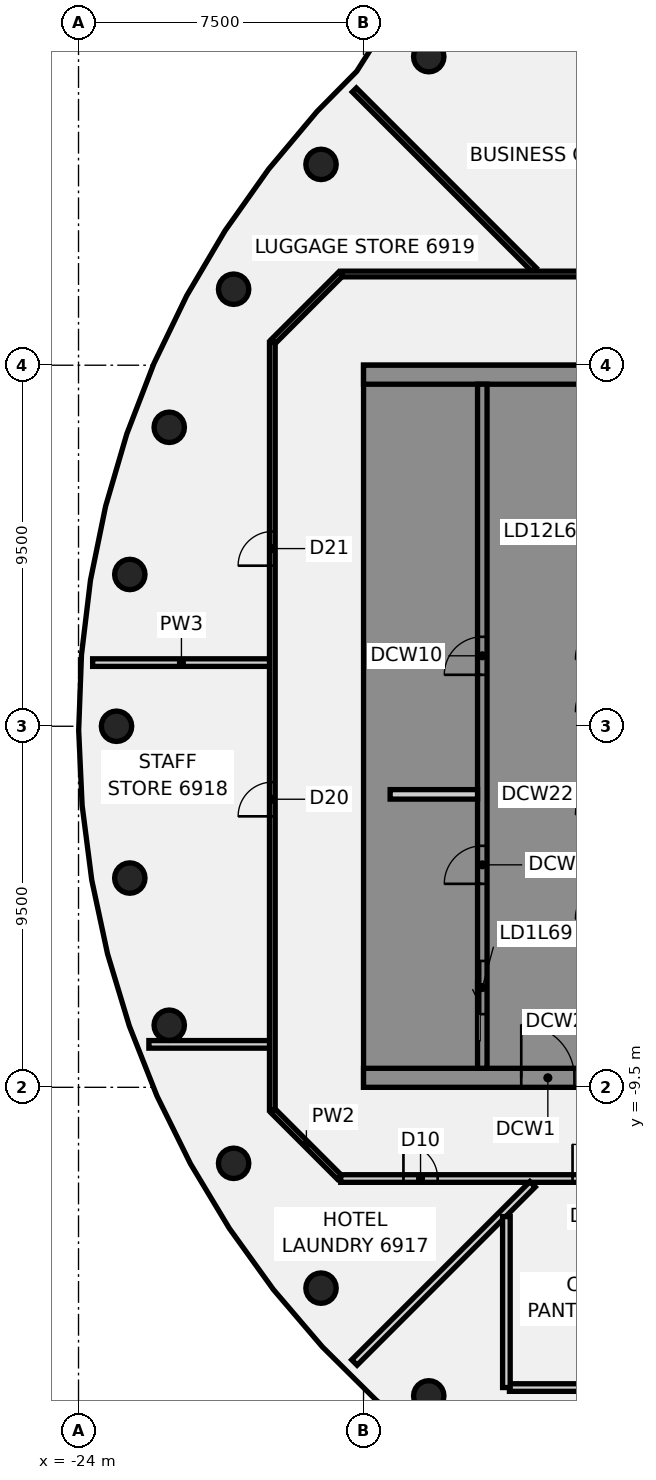
"""IFC4 building model, lengths in metres.
Left out: names, types, materials, properties, quantities, classifications, styles, units other than length and angle.
Written with IfcOpenShell. Run it as: python <this file> out.ifc"""

import sys

from ifc_helpers import new_model, si_unit, direction, frame, frame_2d, origin, origin_2d, place, context, subcontext, project, spatial, polyline, rectangle, circle, outline, extrude, element, fill, save


model = new_model("IFC4")
c1 = context("Model", 3, precision=1e-05, world=origin(), true_north=direction((0.0, 1.0)))
c2 = subcontext(c1, "Body", "Model", "MODEL_VIEW")
j1 = project(units=[si_unit("LENGTHUNIT", "METRE"), si_unit("PLANEANGLEUNIT", "RADIAN")], contexts=[c1])
p1 = place(None, origin())
s1 = spatial("IfcSite", under=j1, at=p1, CompositionType="ELEMENT")
p2 = place(p1, origin())
s2 = spatial("IfcBuilding", under=s1, at=p2, CompositionType="ELEMENT")
p3 = place(p2, frame((0.0, 0.0, 271.2)))
s3 = spatial("IfcBuildingStorey", under=s2, at=p3, CompositionType="ELEMENT", Elevation=271.2)
for number, where, z_axis, x_axis in (
    (1, (-14.784, 17.619, -0.14), (0.0, 0.0, 1.0), (1.0, 0.0, 0.0)),
    (2, (-17.619, 14.784, -0.14), (0.0, 0.0, 1.0), (1.0, 0.0, 0.0)),
    (3, (-19.919, 11.5, -0.14), (0.0, 0.0, 1.0), (1.0, 0.0, 0.0)),
    (4, (-21.613, 7.866, -0.14), (0.0, 0.0, 1.0), (1.0, 0.0, 0.0)),
    (5, (-22.651, 3.994, -0.14), (0.0, 0.0, 1.0), (1.0, 0.0, 0.0)),
    (6, (-23.0, 0.0, -0.14), (0.0, 0.0, 1.0), (1.0, 0.0, 0.0)),
    (7, (-22.651, -3.994, -0.14), (0.0, 0.0, 1.0), (1.0, 0.0, 0.0)),
    (8, (-21.613, -7.866, -0.14), (0.0, 0.0, 1.0), (1.0, 0.0, 0.0)),
    (9, (-19.919, -11.5, -0.14), (0.0, 0.0, 1.0), (1.0, 0.0, 0.0)),
    (10, (-17.619, -14.784, -0.14), (0.0, 0.0, 1.0), (1.0, 0.0, 0.0)),
    (11, (-14.784, -17.619, -0.14), (0.0, 0.0, 1.0), (1.0, 0.0, 0.0)),
):
    element("IfcColumn", number, at=place(p3, frame(where, z_axis=z_axis, x_axis=x_axis)), inside=s3, PredefinedType="COLUMN", context=c2, shape_type="SweptSolid", body=[
        extrude(circle(Radius=0.4, at=origin_2d()), origin(), (0.0, 0.0, 1.0), 3.6),
    ])
p4 = place(p3, frame((-18.872, -10.128, 0.0), z_axis=(0.0, 0.0, 1.0), x_axis=(0.707106781187, -0.707106781187, 0.0)))
e12 = element("IfcWall", 12, at=p4, inside=s3, PredefinedType="PARTITIONING", context=c2, shape_type="SweptSolid", body=[
    extrude(rectangle(XDim=2.455, YDim=0.15, at=frame_2d((1.228, 0.0))), origin(), (0.0, 0.0, 1.0), 2.864),
])
p5 = place(p3, frame((-16.742, 16.742, 0.0), z_axis=(0.0, 0.0, 1.0), x_axis=(0.707106781187, -0.707106781187, 0.0)))
e13 = element("IfcWall", 13, at=p5, inside=s3, PredefinedType="PARTITIONING", context=c2, shape_type="SweptSolid", body=[
    extrude(rectangle(XDim=6.692, YDim=0.15, at=frame_2d((3.346, 0.0))), origin(), (0.0, 0.0, 1.0), 2.864),
])
p6 = place(p3, frame((-15.829, 20.775, 0.0), z_axis=(0.0, 0.0, 1.0), x_axis=(0.912288876362, -0.409547318469, 0.0)))
e14 = element("IfcWall", 14, at=p6, inside=s3, PredefinedType="PARTITIONING", context=c2, shape_type="SweptSolid", body=[
    extrude(rectangle(XDim=21.366, YDim=0.15, at=frame_2d((10.683, 0.0))), origin(), (0.0, 0.0, 1.0), 2.864),
])
p7 = place(p6, frame((13.889, 0.0, 0.0)))
e15 = element("IfcOpeningElement", 15, at=p7, cuts=e14, PredefinedType="OPENING", context=c2, shape_type="SweptSolid", body=[
    extrude(rectangle(XDim=1.8, YDim=2.1, at=frame_2d((0.9, 1.05))), frame((0.0, 0.085, 0.0), z_axis=(0.0, -1.0, 0.0), x_axis=(1.0, 0.0, 0.0)), (0.0, 0.0, 1.0), 0.17),
])
p8 = place(p3, frame((-23.629, 1.675, 0.0), z_axis=(0.0, 0.0, 1.0), x_axis=(1.0, 0.0, 0.0)))
e16 = element("IfcWall", 16, at=p8, inside=s3, PredefinedType="PARTITIONING", context=c2, shape_type="SweptSolid", body=[
    extrude(rectangle(XDim=4.674, YDim=0.2, at=frame_2d((2.337, 0.0))), origin(), (0.0, 0.0, 1.0), 2.864),
])
p9 = place(p3, frame((-22.148, -8.37, 0.0), z_axis=(0.0, 0.0, 1.0), x_axis=(1.0, 0.0, 0.0)))
e17 = element("IfcWall", 17, at=p9, inside=s3, PredefinedType="PARTITIONING", context=c2, shape_type="SweptSolid", body=[
    extrude(rectangle(XDim=3.193, YDim=0.2, at=frame_2d((1.597, 0.0))), origin(), (0.0, 0.0, 1.0), 2.864),
])
p10 = place(p3, frame((-17.1, -11.9, 0.0), z_axis=(0.0, 0.0, 1.0), x_axis=(1.0, 0.0, 0.0)))
e18 = element("IfcWall", 18, at=p10, inside=s3, PredefinedType="PARTITIONING", context=c2, shape_type="SweptSolid", body=[
    extrude(rectangle(XDim=34.165, YDim=0.2, at=frame_2d((17.083, 0.0))), origin(), (0.0, 0.0, 1.0), 2.864),
])
p11 = place(p10, frame((6.1, 0.0, 0.0)))
e19 = element("IfcOpeningElement", 19, at=p11, cuts=e18, PredefinedType="OPENING", context=c2, shape_type="SweptSolid", body=[
    extrude(rectangle(XDim=0.9, YDim=2.1, at=frame_2d((0.45, 1.05))), frame((0.0, 0.11, 0.0), z_axis=(0.0, -1.0, 0.0), x_axis=(1.0, 0.0, 0.0)), (0.0, 0.0, 1.0), 0.22),
])
p12 = place(p10, frame((26.541, 0.0, 0.0)))
e20 = element("IfcOpeningElement", 20, at=p12, cuts=e18, PredefinedType="OPENING", context=c2, shape_type="SweptSolid", body=[
    extrude(rectangle(XDim=1.8, YDim=2.1, at=frame_2d((0.9, 1.05))), frame((0.0, 0.11, 0.0), z_axis=(0.0, -1.0, 0.0), x_axis=(1.0, 0.0, 0.0)), (0.0, 0.0, 1.0), 0.22),
])
p13 = place(p10, frame((17.778, 0.0, 0.0)))
e21 = element("IfcOpeningElement", 21, at=p13, cuts=e18, PredefinedType="OPENING", context=c2, shape_type="SweptSolid", body=[
    extrude(rectangle(XDim=1.8, YDim=2.1, at=frame_2d((0.9, 1.05))), frame((0.0, 0.11, 0.0), z_axis=(0.0, -1.0, 0.0), x_axis=(1.0, 0.0, 0.0)), (0.0, 0.0, 1.0), 0.22),
])
p14 = place(p10, frame((10.359, 0.0, 0.0)))
e22 = element("IfcOpeningElement", 22, at=p14, cuts=e18, PredefinedType="OPENING", context=c2, shape_type="SweptSolid", body=[
    extrude(rectangle(XDim=0.9, YDim=2.1, at=frame_2d((0.45, 1.05))), frame((0.0, 0.11, 0.0), z_axis=(0.0, -1.0, 0.0), x_axis=(1.0, 0.0, 0.0)), (0.0, 0.0, 1.0), 0.22),
])
p15 = place(p10, frame((1.65, 0.0, 0.0)))
e23 = element("IfcOpeningElement", 23, at=p15, cuts=e18, PredefinedType="OPENING", context=c2, shape_type="SweptSolid", body=[
    extrude(rectangle(XDim=0.9, YDim=2.1, at=frame_2d((0.45, 1.05))), frame((0.0, 0.11, 0.0), z_axis=(0.0, -1.0, 0.0), x_axis=(1.0, 0.0, 0.0)), (0.0, 0.0, 1.0), 0.22),
])
p16 = place(p3, frame((-17.065, 11.9, 0.0), z_axis=(0.0, 0.0, 1.0), x_axis=(1.0, 0.0, 0.0)))
e24 = element("IfcWall", 24, at=p16, inside=s3, PredefinedType="PARTITIONING", context=c2, shape_type="SweptSolid", body=[
    extrude(rectangle(XDim=34.165, YDim=0.15, at=frame_2d((17.083, 0.0))), origin(), (0.0, 0.0, 1.0), 2.864),
])
p17 = place(p16, frame((23.556, 0.0, 0.0)))
e25 = element("IfcOpeningElement", 25, at=p17, cuts=e24, PredefinedType="OPENING", context=c2, shape_type="SweptSolid", body=[
    extrude(rectangle(XDim=1.8, YDim=2.1, at=frame_2d((0.9, 1.05))), frame((0.0, 0.085, 0.0), z_axis=(0.0, -1.0, 0.0), x_axis=(1.0, 0.0, 0.0)), (0.0, 0.0, 1.0), 0.17),
])
p18 = place(p16, frame((30.465, 0.0, 0.0)))
e26 = element("IfcOpeningElement", 26, at=p18, cuts=e24, PredefinedType="OPENING", context=c2, shape_type="SweptSolid", body=[
    extrude(rectangle(XDim=0.9, YDim=2.1, at=frame_2d((0.45, 1.05))), frame((0.0, 0.085, 0.0), z_axis=(0.0, -1.0, 0.0), x_axis=(1.0, 0.0, 0.0)), (0.0, 0.0, 1.0), 0.17),
])
p19 = place(p16, frame((12.215, 0.0, 0.0)))
e27 = element("IfcOpeningElement", 27, at=p19, cuts=e24, PredefinedType="OPENING", context=c2, shape_type="SweptSolid", body=[
    extrude(rectangle(XDim=1.8, YDim=2.1, at=frame_2d((0.9, 1.05))), frame((0.0, 0.085, 0.0), z_axis=(0.0, -1.0, 0.0), x_axis=(1.0, 0.0, 0.0)), (0.0, 0.0, 1.0), 0.17),
])
p20 = place(p3, frame((-12.661, -17.4, 0.0), z_axis=(0.0, 0.0, 1.0), x_axis=(1.0, 0.0, 0.0)))
e28 = element("IfcWall", 28, at=p20, inside=s3, PredefinedType="PARTITIONING", context=c2, shape_type="SweptSolid", body=[
    extrude(rectangle(XDim=4.34, YDim=0.2, at=frame_2d((2.17, 0.0))), origin(), (0.0, 0.0, 1.0), 2.864),
])
p21 = place(p3, frame((-18.872, 10.128, 0.0), z_axis=(0.0, 0.0, 1.0), x_axis=(0.707106781187, 0.707106781187, 0.0)))
e29 = element("IfcWall", 29, at=p21, inside=s3, PredefinedType="PARTITIONING", context=c2, shape_type="SweptSolid", body=[
    extrude(rectangle(XDim=2.505, YDim=0.15, at=frame_2d((1.253, 0.0))), origin(), (0.0, 0.0, 1.0), 2.864),
])
p22 = place(p3, frame((-16.74, -16.74, 0.0), z_axis=(0.0, 0.0, 1.0), x_axis=(0.707106781187, 0.707106781187, 0.0)))
e30 = element("IfcWall", 30, at=p22, inside=s3, PredefinedType="PARTITIONING", context=c2, shape_type="SweptSolid", body=[
    extrude(rectangle(XDim=6.631, YDim=0.2, at=frame_2d((3.315, 0.0))), origin(), (0.0, 0.0, 1.0), 2.864),
])
p23 = place(p3, frame((-18.9, -10.1, 0.0), z_axis=(0.0, 0.0, 1.0), x_axis=(0.0, 1.0, 0.0)))
e31 = element("IfcWall", 31, at=p23, inside=s3, PredefinedType="PARTITIONING", context=c2, shape_type="SweptSolid", body=[
    extrude(rectangle(XDim=20.2, YDim=0.15, at=frame_2d((10.1, 0.0))), origin(), (0.0, 0.0, 1.0), 2.864),
])
p24 = place(p23, frame((7.73, 0.0, 0.0)))
e32 = element("IfcOpeningElement", 32, at=p24, cuts=e31, PredefinedType="OPENING", context=c2, shape_type="SweptSolid", body=[
    extrude(rectangle(XDim=0.9, YDim=2.1, at=frame_2d((0.45, 1.05))), frame((0.0, 0.085, 0.0), z_axis=(0.0, -1.0, 0.0), x_axis=(1.0, 0.0, 0.0)), (0.0, 0.0, 1.0), 0.17),
])
p25 = place(p23, frame((14.325, 0.0, 0.0)))
e33 = element("IfcOpeningElement", 33, at=p25, cuts=e31, PredefinedType="OPENING", context=c2, shape_type="SweptSolid", body=[
    extrude(rectangle(XDim=0.9, YDim=2.1, at=frame_2d((0.45, 1.05))), frame((0.0, 0.085, 0.0), z_axis=(0.0, -1.0, 0.0), x_axis=(1.0, 0.0, 0.0)), (0.0, 0.0, 1.0), 0.17),
])
p26 = place(p3, frame((-12.741, -17.4, 0.0), z_axis=(0.0, 0.0, 1.0), x_axis=(0.0, 1.0, 0.0)))
e34 = element("IfcWall", 34, at=p26, inside=s3, PredefinedType="PARTITIONING", context=c2, shape_type="SweptSolid", body=[
    extrude(rectangle(XDim=4.499, YDim=0.2, at=frame_2d((2.25, 0.0))), origin(), (0.0, 0.0, 1.0), 2.864),
])
p27 = place(p3, frame((-16.5, -9.25, 0.0), z_axis=(0.0, 0.0, 1.0), x_axis=(1.0, 0.0, 0.0)))
e35 = element("IfcWall", 35, at=p27, inside=s3, PredefinedType="SHEAR", context=c2, shape_type="SweptSolid", body=[
    extrude(rectangle(XDim=13.0, YDim=0.5, at=frame_2d((6.5, 0.0))), origin(), (0.0, 0.0, 1.0), 3.46),
])
p28 = place(p27, frame((4.15, 0.0, 0.0)))
e36 = element("IfcOpeningElement", 36, at=p28, cuts=e35, PredefinedType="OPENING", context=c2, shape_type="SweptSolid", body=[
    extrude(rectangle(XDim=1.4, YDim=2.1, at=frame_2d((0.7, 1.05))), frame((0.0, 0.26, 0.0), z_axis=(0.0, -1.0, 0.0), x_axis=(1.0, 0.0, 0.0)), (0.0, 0.0, 1.0), 0.52),
])
p29 = place(p27, frame((10.125, 0.0, 0.0)))
e37 = element("IfcOpeningElement", 37, at=p29, cuts=e35, PredefinedType="OPENING", context=c2, shape_type="SweptSolid", body=[
    extrude(rectangle(XDim=1.4, YDim=2.1, at=frame_2d((0.7, 1.05))), frame((0.0, 0.26, 0.0), z_axis=(0.0, -1.0, 0.0), x_axis=(1.0, 0.0, 0.0)), (0.0, 0.0, 1.0), 0.52),
])
p30 = place(p3, origin())
e38 = element("IfcWall", 38, at=p30, inside=s3, PredefinedType="SHEAR", context=c2, shape_type="SweptSolid", body=[
    extrude(outline(polyline([(-13.5, -8.125), (-16.0, -8.125), (-16.0, -5.625), (-13.5, -5.625), (-13.5, -5.375), (-16.0, -5.375), (-16.0, 5.375), (-13.5, 5.375), (-13.5, 5.625), (-16.0, 5.625), (-16.0, 8.125), (-13.5, 8.125), (-13.5, 9.0), (-16.0, 9.0), (-16.5, 9.0), (-16.5, -9.0), (-16.0, -9.0), (-13.5, -9.0), (-13.5, -8.125)])), origin(), (0.0, 0.0, 1.0), 3.46),
])
p31 = place(p3, frame((-16.5, 9.25, 0.0), z_axis=(0.0, 0.0, 1.0), x_axis=(1.0, 0.0, 0.0)))
e39 = element("IfcWall", 39, at=p31, inside=s3, PredefinedType="SHEAR", context=c2, shape_type="SweptSolid", body=[
    extrude(rectangle(XDim=13.0, YDim=0.5, at=frame_2d((6.5, 0.0))), origin(), (0.0, 0.0, 1.0), 3.46),
])
p32 = place(p3, frame((-13.375, -9.0, 0.0), z_axis=(0.0, 0.0, 1.0), x_axis=(0.0, 1.0, 0.0)))
e40 = element("IfcWall", 40, at=p32, inside=s3, PredefinedType="SHEAR", context=c2, shape_type="SweptSolid", body=[
    extrude(rectangle(XDim=18.0, YDim=0.25, at=frame_2d((9.0, 0.0))), origin(), (0.0, 0.0, 1.0), 3.46),
])
p33 = place(p32, frame((1.425, 0.0, 0.0)))
e41 = element("IfcOpeningElement", 41, at=p33, cuts=e40, PredefinedType="OPENING", context=c2, shape_type="SweptSolid", body=[
    extrude(rectangle(XDim=1.4, YDim=2.1, at=frame_2d((0.7, 1.05))), frame((0.0, 0.135, 0.0), z_axis=(0.0, -1.0, 0.0), x_axis=(1.0, 0.0, 0.0)), (0.0, 0.0, 1.0), 0.27),
])
p34 = place(p32, frame((4.854, 0.0, 0.0)))
e42 = element("IfcOpeningElement", 42, at=p34, cuts=e40, PredefinedType="OPENING", context=c2, shape_type="SweptSolid", body=[
    extrude(rectangle(XDim=1.0, YDim=2.1, at=frame_2d((0.5, 1.05))), frame((0.0, 0.135, 0.0), z_axis=(0.0, -1.0, 0.0), x_axis=(1.0, 0.0, 0.0)), (0.0, 0.0, 1.0), 0.27),
])
p35 = place(p32, frame((10.354, 0.0, 0.0)))
e43 = element("IfcOpeningElement", 43, at=p35, cuts=e40, PredefinedType="OPENING", context=c2, shape_type="SweptSolid", body=[
    extrude(rectangle(XDim=1.0, YDim=2.1, at=frame_2d((0.5, 1.05))), frame((0.0, 0.135, 0.0), z_axis=(0.0, -1.0, 0.0), x_axis=(1.0, 0.0, 0.0)), (0.0, 0.0, 1.0), 0.27),
])
p36 = place(p3, frame((-15.8, -1.792, 0.0), z_axis=(0.0, 0.0, 1.0), x_axis=(1.0, 0.0, 0.0)))
e44 = element("IfcWall", 44, at=p36, inside=s3, PredefinedType="PARTITIONING", context=c2, shape_type="SweptSolid", body=[
    extrude(rectangle(XDim=2.3, YDim=0.25, at=frame_2d((1.15, 0.0))), origin(), (0.0, 0.0, 1.0), 3.46),
])
p37 = place(p11, frame((0.9, 0.0, 0.0), z_axis=(0.0, 0.0, 1.0), x_axis=(-1.0, 0.0, 0.0)))
e45 = element("IfcDoor", 45, at=p37, inside=s3, OperationType="SINGLE_SWING_LEFT", PredefinedType="DOOR", context=c2, shape_type="SweptSolid", body=[
    extrude(rectangle(XDim=0.9, YDim=2.1, at=frame_2d((0.45, 1.05))), frame((0.0, 0.025, 0.0), z_axis=(0.0, -1.0, 0.0), x_axis=(1.0, 0.0, 0.0)), (0.0, 0.0, 1.0), 0.05),
])
fill(e19, e45)
p38 = place(p15, frame((0.9, 0.0, 0.0), z_axis=(0.0, 0.0, 1.0), x_axis=(-1.0, 0.0, 0.0)))
e46 = element("IfcDoor", 46, at=p38, inside=s3, OperationType="SINGLE_SWING_LEFT", PredefinedType="DOOR", context=c2, shape_type="SweptSolid", body=[
    extrude(rectangle(XDim=0.9, YDim=2.1, at=frame_2d((0.45, 1.05))), frame((0.0, 0.025, 0.0), z_axis=(0.0, -1.0, 0.0), x_axis=(1.0, 0.0, 0.0)), (0.0, 0.0, 1.0), 0.05),
])
fill(e23, e46)
p39 = place(p24, origin())
e47 = element("IfcDoor", 47, at=p39, inside=s3, OperationType="SINGLE_SWING_RIGHT", PredefinedType="DOOR", context=c2, shape_type="SweptSolid", body=[
    extrude(rectangle(XDim=0.9, YDim=2.1, at=frame_2d((0.45, 1.05))), frame((0.0, 0.025, 0.0), z_axis=(0.0, -1.0, 0.0), x_axis=(1.0, 0.0, 0.0)), (0.0, 0.0, 1.0), 0.05),
])
fill(e32, e47)
p40 = place(p25, origin())
e48 = element("IfcDoor", 48, at=p40, inside=s3, OperationType="SINGLE_SWING_LEFT", PredefinedType="DOOR", context=c2, shape_type="SweptSolid", body=[
    extrude(rectangle(XDim=0.9, YDim=2.1, at=frame_2d((0.45, 1.05))), frame((0.0, 0.025, 0.0), z_axis=(0.0, -1.0, 0.0), x_axis=(1.0, 0.0, 0.0)), (0.0, 0.0, 1.0), 0.05),
])
fill(e33, e48)
p41 = place(p28, origin())
e49 = element("IfcDoor", 49, at=p41, inside=s3, OperationType="SINGLE_SWING_LEFT", PredefinedType="DOOR", context=c2, shape_type="SweptSolid", body=[
    extrude(rectangle(XDim=1.4, YDim=2.1, at=frame_2d((0.7, 1.05))), frame((0.0, 0.025, 0.0), z_axis=(0.0, -1.0, 0.0), x_axis=(1.0, 0.0, 0.0)), (0.0, 0.0, 1.0), 0.05),
])
fill(e36, e49)
p42 = place(p33, origin())
e50 = element("IfcDoor", 50, at=p42, inside=s3, OperationType="SLIDING_TO_LEFT", PredefinedType="DOOR", context=c2, shape_type="SweptSolid", body=[
    extrude(rectangle(XDim=1.4, YDim=2.1, at=frame_2d((0.7, 1.05))), frame((0.0, 0.025, 0.0), z_axis=(0.0, -1.0, 0.0), x_axis=(1.0, 0.0, 0.0)), (0.0, 0.0, 1.0), 0.05),
])
fill(e41, e50)
p43 = place(p34, origin())
e51 = element("IfcDoor", 51, at=p43, inside=s3, OperationType="SINGLE_SWING_LEFT", PredefinedType="DOOR", context=c2, shape_type="SweptSolid", body=[
    extrude(rectangle(XDim=1.0, YDim=2.1, at=frame_2d((0.5, 1.05))), frame((0.0, 0.025, 0.0), z_axis=(0.0, -1.0, 0.0), x_axis=(1.0, 0.0, 0.0)), (0.0, 0.0, 1.0), 0.05),
])
fill(e42, e51)
p44 = place(p35, origin())
e52 = element("IfcDoor", 52, at=p44, inside=s3, OperationType="SINGLE_SWING_LEFT", PredefinedType="DOOR", context=c2, shape_type="SweptSolid", body=[
    extrude(rectangle(XDim=1.0, YDim=2.1, at=frame_2d((0.5, 1.05))), frame((0.0, 0.025, 0.0), z_axis=(0.0, -1.0, 0.0), x_axis=(1.0, 0.0, 0.0)), (0.0, 0.0, 1.0), 0.05),
])
fill(e43, e52)
save(model, sys.argv[1])
